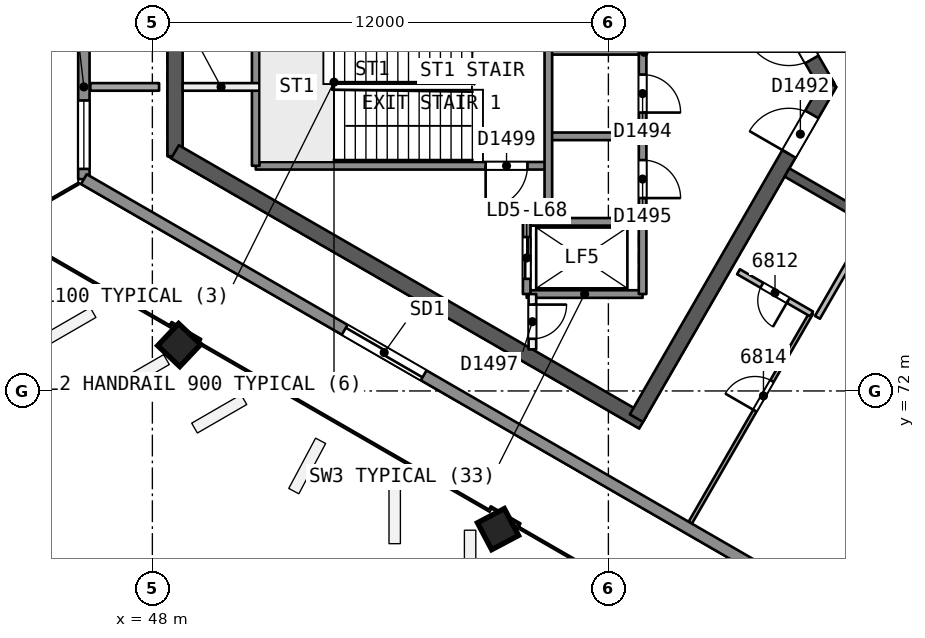
"""IFC4 building model, lengths in metres.
Left out: names, types, materials, properties, quantities, classifications, styles, units other than length and angle.
Written with IfcOpenShell. Run it as: python <this file> out.ifc"""

import sys

from ifc_helpers import new_model, si_unit, direction, frame, frame_2d, origin, origin_2d, place, context, subcontext, project, spatial, rectangle, extrude, element, fill, save


model = new_model("IFC4")
c1 = context("Model", 3, precision=1e-05, world=origin(), true_north=direction((0.0, 1.0)))
c2 = subcontext(c1, "Body", "Model", "MODEL_VIEW")
j1 = project(units=[si_unit("LENGTHUNIT", "METRE"), si_unit("PLANEANGLEUNIT", "RADIAN")], contexts=[c1])
p1 = place(None, origin())
s1 = spatial("IfcSite", under=j1, at=p1, CompositionType="ELEMENT")
p2 = place(p1, origin())
s2 = spatial("IfcBuilding", under=s1, at=p2, CompositionType="ELEMENT")
p3 = place(p2, frame((0.0, 0.0, 277.5)))
s3 = spatial("IfcBuildingStorey", under=s2, at=p3, CompositionType="ELEMENT", Elevation=277.5)
p4 = place(p3, frame((65.769, 80.0, 0.0), z_axis=(0.0, 0.0, 1.0), x_axis=(-0.50000177223, 0.866024380585, 0.0)))
e1 = element("IfcWall", 1, at=p4, inside=s3, PredefinedType="SHEAR", context=c2, shape_type="SweptSolid", body=[
    extrude(rectangle(XDim=10.265, YDim=0.4, at=frame_2d((5.132, 0.0))), origin(), (0.0, 0.0, 1.0), 3.7),
])
p5 = place(p4, frame((0.834, 0.0, 0.0)))
e2 = element("IfcOpeningElement", 2, at=p5, cuts=e1, PredefinedType="OPENING", context=c2, shape_type="SweptSolid", body=[
    extrude(rectangle(XDim=1.2, YDim=2.1, at=frame_2d((0.6, 1.05))), frame((0.0, 0.21, 0.0), z_axis=(0.0, -1.0, 0.0), x_axis=(1.0, 0.0, 0.0)), (0.0, 0.0, 1.0), 0.421),
])
p6 = place(p3, frame((48.597, 81.707, 0.0), z_axis=(0.0, 0.0, 1.0), x_axis=(0.0, -1.0, 0.0)))
e3 = element("IfcWall", 3, at=p6, inside=s3, PredefinedType="SHEAR", context=c2, shape_type="SweptSolid", body=[
    extrude(rectangle(XDim=3.53, YDim=0.4, at=frame_2d((1.765, 0.0))), origin(), (0.0, 0.0, 1.0), 3.7),
])
p7 = place(p3, frame((48.597, 78.293, 0.0), z_axis=(0.0, 0.0, 1.0), x_axis=(0.866026024469, -0.499998924941, 0.0)))
e4 = element("IfcWall", 4, at=p7, inside=s3, PredefinedType="SHEAR", context=c2, shape_type="SweptSolid", body=[
    extrude(rectangle(XDim=14.218, YDim=0.4, at=frame_2d((7.109, 0.0))), origin(), (0.0, 0.0, 1.0), 3.7),
])
p8 = place(p3, frame((60.737, 71.284, 0.0), z_axis=(0.0, 0.0, 1.0), x_axis=(0.50000547566, 0.866022242388, 0.0)))
e5 = element("IfcWall", 5, at=p8, inside=s3, PredefinedType="SHEAR", context=c2, shape_type="SweptSolid", body=[
    extrude(rectangle(XDim=10.18, YDim=0.4, at=frame_2d((5.09, 0.0))), origin(), (0.0, 0.0, 1.0), 3.7),
])
p9 = place(p8, frame((8.03, 0.0, 0.0)))
e6 = element("IfcOpeningElement", 6, at=p9, cuts=e5, PredefinedType="OPENING", context=c2, shape_type="SweptSolid", body=[
    extrude(rectangle(XDim=1.2, YDim=2.1, at=frame_2d((0.6, 1.05))), frame((0.0, 0.21, 0.0), z_axis=(0.0, -1.0, 0.0), x_axis=(1.0, 0.0, 0.0)), (0.0, 0.0, 1.0), 0.421),
])
p10 = place(p3, frame((64.7, 77.748, 0.0), z_axis=(0.0, 0.0, 1.0), x_axis=(0.866026492143, -0.499998114903, 0.0)))
e7 = element("IfcWall", 7, at=p10, inside=s3, PredefinedType="SHEAR", context=c2, shape_type="SweptSolid", body=[
    extrude(rectangle(XDim=15.588, YDim=0.25, at=frame_2d((7.794, 0.0))), origin(), (0.0, 0.0, 1.0), 3.3),
])
p11 = place(p10, frame((4.473, 0.0, 0.0)))
e8 = element("IfcOpeningElement", 8, at=p11, cuts=e7, PredefinedType="OPENING", context=c2, shape_type="SweptSolid", body=[
    extrude(rectangle(XDim=1.0, YDim=2.1, at=frame_2d((0.5, 1.05))), frame((0.0, 0.135, 0.0), z_axis=(0.0, -1.0, 0.0), x_axis=(1.0, 0.0, 0.0)), (0.0, 0.0, 1.0), 0.271),
])
p12 = place(p10, frame((13.917, 0.0, 0.0)))
e9 = element("IfcOpeningElement", 9, at=p12, cuts=e7, PredefinedType="OPENING", context=c2, shape_type="SweptSolid", body=[
    extrude(rectangle(XDim=1.1, YDim=2.1, at=frame_2d((0.55, 1.05))), frame((0.0, 0.135, 0.0), z_axis=(0.0, -1.0, 0.0), x_axis=(1.0, 0.0, 0.0)), (0.0, 0.0, 1.0), 0.271),
])
p13 = place(p3, frame((48.672, 73.2, 0.0), z_axis=(0.02855911485, 0.006793507689, 0.999569019734), x_axis=(-0.865318766308, 0.500768301983, 0.021319953197)))
e10 = element("IfcColumn", 10, at=p13, inside=s3, PredefinedType="COLUMN", context=c2, shape_type="SweptSolid", body=[
    extrude(rectangle(XDim=0.8, YDim=0.8, at=origin_2d()), origin(), (0.0, 0.0, 1.0), 3.702),
])
p14 = place(p3, frame((57.073, 68.35, 0.0), z_axis=(0.019328516974, 0.012138044789, 0.999739504221), x_axis=(-0.865682738121, 0.50047952503, 0.010660297569)))
e11 = element("IfcColumn", 11, at=p14, inside=s3, PredefinedType="COLUMN", context=c2, shape_type="SweptSolid", body=[
    extrude(rectangle(XDim=0.8, YDim=0.8, at=origin_2d()), origin(), (0.0, 0.0, 1.0), 3.701),
])
p15 = place(p3, frame((46.368, 80.0, 0.0), z_axis=(0.0, 0.0, 1.0), x_axis=(1.0, 0.0, 0.0)))
e12 = element("IfcWall", 12, at=p15, inside=s3, PredefinedType="PARTITIONING", context=c2, shape_type="SweptSolid", body=[
    extrude(rectangle(XDim=1.809, YDim=0.2, at=frame_2d((0.905, 0.0))), origin(), (0.0, 0.0, 1.0), 3.3),
])
p16 = place(p3, frame((62.154, 68.534, 0.0), z_axis=(0.0, 0.0, 1.0), x_axis=(0.499987773676, 0.866032462541, 0.0)))
e13 = element("IfcWall", 13, at=p16, inside=s3, PredefinedType="PARTITIONING", context=c2, shape_type="SweptSolid", body=[
    extrude(rectangle(XDim=6.372, YDim=0.1, at=frame_2d((3.186, 0.0))), origin(), (0.0, 0.0, 1.0), 3.3),
])
p17 = place(p16, frame((3.403, 0.0, 0.0)))
e14 = element("IfcOpeningElement", 14, at=p17, cuts=e13, PredefinedType="OPENING", context=c2, shape_type="SweptSolid", body=[
    extrude(rectangle(XDim=0.9, YDim=2.1, at=frame_2d((0.45, 1.05))), frame((0.0, 0.061, 0.0), z_axis=(0.0, -1.0, 0.0), x_axis=(1.0, 0.0, 0.0)), (0.0, 0.0, 1.0), 0.121),
])
p18 = place(p3, frame((65.347, 74.026, 0.0), z_axis=(0.0, 0.0, 1.0), x_axis=(-0.866042797968, 0.49996987118, 0.0)))
e15 = element("IfcWall", 15, at=p18, inside=s3, PredefinedType="PARTITIONING", context=c2, shape_type="SweptSolid", body=[
    extrude(rectangle(XDim=2.221, YDim=0.15, at=frame_2d((1.11, 0.0))), origin(), (0.0, 0.0, 1.0), 3.3),
])
p19 = place(p18, frame((0.711, 0.0, 0.0)))
e16 = element("IfcOpeningElement", 16, at=p19, cuts=e15, PredefinedType="OPENING", context=c2, shape_type="SweptSolid", body=[
    extrude(rectangle(XDim=0.8, YDim=2.1, at=frame_2d((0.4, 1.05))), frame((0.0, 0.085, 0.0), z_axis=(0.0, -1.0, 0.0), x_axis=(1.0, 0.0, 0.0)), (0.0, 0.0, 1.0), 0.171),
])
p20 = place(p3, frame((66.952, 76.448, 0.0), z_axis=(0.0, 0.0, 1.0), x_axis=(-0.499987231761, -0.866032775405, 0.0)))
e17 = element("IfcWall", 17, at=p20, inside=s3, PredefinedType="PARTITIONING", context=c2, shape_type="SweptSolid", body=[
    extrude(rectangle(XDim=2.9, YDim=0.15, at=frame_2d((1.45, 0.0))), origin(), (0.0, 0.0, 1.0), 3.3),
])
p21 = place(p3, frame((46.198, 77.573, 0.0), z_axis=(0.0, 0.0, 1.0), x_axis=(0.0, 1.0, 0.0)))
e18 = element("IfcWall", 18, at=p21, inside=s3, PredefinedType="SOLIDWALL", context=c2, shape_type="SweptSolid", body=[
    extrude(rectangle(XDim=4.854, YDim=0.3, at=frame_2d((2.427, 0.0))), origin(), (0.0, 0.0, 1.0), 3.3),
])
p22 = place(p21, frame((0.27, 0.0, 0.9)))
e19 = element("IfcOpeningElement", 19, at=p22, cuts=e18, PredefinedType="OPENING", context=c2, shape_type="SweptSolid", body=[
    extrude(rectangle(XDim=1.8, YDim=1.5, at=frame_2d((0.9, 0.75))), frame((0.0, 0.161, 0.0), z_axis=(0.0, -1.0, 0.0), x_axis=(1.0, 0.0, 0.0)), (0.0, 0.0, 1.0), 0.321),
])
p23 = place(p3, frame((87.299, 53.843, 0.0), z_axis=(0.0, 0.0, 1.0), x_axis=(-0.866024279277, 0.500001947699, 0.0)))
e20 = element("IfcWall", 20, at=p23, inside=s3, PredefinedType="SOLIDWALL", context=c2, shape_type="SweptSolid", body=[
    extrude(rectangle(XDim=47.46, YDim=0.3, at=frame_2d((23.73, 0.0))), origin(), (0.0, 0.0, 1.0), 3.3),
])
p24 = place(p23, frame((17.308, 0.0, 0.0)))
e21 = element("IfcOpeningElement", 21, at=p24, cuts=e20, PredefinedType="OPENING", context=c2, shape_type="SweptSolid", body=[
    extrude(rectangle(XDim=2.4, YDim=2.4, at=frame_2d((1.2, 1.2))), frame((0.0, 0.161, 0.0), z_axis=(0.0, -1.0, 0.0), x_axis=(1.0, 0.0, 0.0)), (0.0, 0.0, 1.0), 0.321),
])
p25 = place(p23, frame((37.135, 0.0, 0.0)))
e22 = element("IfcOpeningElement", 22, at=p25, cuts=e20, PredefinedType="OPENING", context=c2, shape_type="SweptSolid", body=[
    extrude(rectangle(XDim=2.4, YDim=2.4, at=frame_2d((1.2, 1.2))), frame((0.0, 0.161, 0.0), z_axis=(0.0, -1.0, 0.0), x_axis=(1.0, 0.0, 0.0)), (0.0, 0.0, 1.0), 0.321),
])
p26 = place(p23, frame((23.901, 0.0, 0.0)))
e23 = element("IfcOpeningElement", 23, at=p26, cuts=e20, PredefinedType="OPENING", context=c2, shape_type="SweptSolid", body=[
    extrude(rectangle(XDim=2.4, YDim=2.4, at=frame_2d((1.2, 1.2))), frame((0.0, 0.161, 0.0), z_axis=(0.0, -1.0, 0.0), x_axis=(1.0, 0.0, 0.0)), (0.0, 0.0, 1.0), 0.321),
])
p27 = place(p3, frame((60.9, 80.95, 0.0), z_axis=(0.0, 0.0, 1.0), x_axis=(-1.0, 0.0, 0.0)))
e24 = element("IfcWall", 24, at=p27, inside=s3, PredefinedType="SOLIDWALL", context=c2, shape_type="SweptSolid", body=[
    extrude(rectangle(XDim=2.48, YDim=0.2, at=frame_2d((1.24, 0.0))), origin(), (0.0, 0.0, 1.0), 3.3),
])
p28 = place(p3, frame((50.82, 80.0, 0.0), z_axis=(0.0, 0.0, 1.0), x_axis=(-1.0, 0.0, 0.0)))
e25 = element("IfcWall", 25, at=p28, inside=s3, PredefinedType="PARTITIONING", context=c2, shape_type="SweptSolid", body=[
    extrude(rectangle(XDim=2.023, YDim=0.2, at=frame_2d((1.012, 0.0))), origin(), (0.0, 0.0, 1.0), 3.3),
])
p29 = place(p3, frame((60.9, 78.7, 0.0), z_axis=(0.0, 0.0, 1.0), x_axis=(-1.0, 0.0, 0.0)))
e26 = element("IfcWall", 26, at=p29, inside=s3, PredefinedType="SOLIDWALL", context=c2, shape_type="SweptSolid", body=[
    extrude(rectangle(XDim=2.48, YDim=0.2, at=frame_2d((1.24, 0.0))), origin(), (0.0, 0.0, 1.0), 3.3),
])
p30 = place(p3, frame((58.42, 77.925, 0.0), z_axis=(0.0, 0.0, 1.0), x_axis=(-1.0, 0.0, 0.0)))
e27 = element("IfcWall", 27, at=p30, inside=s3, PredefinedType="SOLIDWALL", context=c2, shape_type="SweptSolid", body=[
    extrude(rectangle(XDim=7.7, YDim=0.2, at=frame_2d((3.85, 0.0))), origin(), (0.0, 0.0, 1.0), 3.3),
])
p31 = place(p30, frame((0.55, 0.0, 0.0)))
e28 = element("IfcOpeningElement", 28, at=p31, cuts=e27, PredefinedType="OPENING", context=c2, shape_type="SweptSolid", body=[
    extrude(rectangle(XDim=1.1, YDim=2.1, at=frame_2d((0.55, 1.05))), frame((0.0, 0.11, 0.0), z_axis=(0.0, -1.0, 0.0), x_axis=(1.0, 0.0, 0.0)), (0.0, 0.0, 1.0), 0.221),
])
for number, where, z_axis, x_axis in (
    (29, (60.9, 76.45, 0.0), (0.0, 0.0, 1.0), (-1.0, 0.0, 0.0)),
    (30, (60.9, 74.55, 0.0), (0.0, 0.0, 1.0), (-1.0, 0.0, 0.0)),
):
    element("IfcWall", number, at=place(p3, frame(where, z_axis=z_axis, x_axis=x_axis)), inside=s3, PredefinedType="SOLIDWALL", context=c2, shape_type="SweptSolid", body=[
        extrude(rectangle(XDim=3.05, YDim=0.2, at=frame_2d((1.525, 0.0))), origin(), (0.0, 0.0, 1.0), 3.3),
    ])
p32 = place(p3, frame((60.9, 85.45, 0.0), z_axis=(0.0, 0.0, 1.0), x_axis=(0.0, -1.0, 0.0)))
e31 = element("IfcWall", 31, at=p32, inside=s3, PredefinedType="SOLIDWALL", context=c2, shape_type="SweptSolid", body=[
    extrude(rectangle(XDim=10.9, YDim=0.2, at=frame_2d((5.45, 0.0))), origin(), (0.0, 0.0, 1.0), 3.3),
])
p33 = place(p32, frame((1.75, 0.0, 0.0)))
e32 = element("IfcOpeningElement", 32, at=p33, cuts=e31, PredefinedType="OPENING", context=c2, shape_type="SweptSolid", body=[
    extrude(rectangle(XDim=1.0, YDim=2.1, at=frame_2d((0.5, 1.05))), frame((0.0, 0.11, 0.0), z_axis=(0.0, -1.0, 0.0), x_axis=(1.0, 0.0, 0.0)), (0.0, 0.0, 1.0), 0.221),
])
p34 = place(p32, frame((5.125, 0.0, 0.0)))
e33 = element("IfcOpeningElement", 33, at=p34, cuts=e31, PredefinedType="OPENING", context=c2, shape_type="SweptSolid", body=[
    extrude(rectangle(XDim=1.0, YDim=2.1, at=frame_2d((0.5, 1.05))), frame((0.0, 0.11, 0.0), z_axis=(0.0, -1.0, 0.0), x_axis=(1.0, 0.0, 0.0)), (0.0, 0.0, 1.0), 0.221),
])
p35 = place(p32, frame((7.375, 0.0, 0.0)))
e34 = element("IfcOpeningElement", 34, at=p35, cuts=e31, PredefinedType="OPENING", context=c2, shape_type="SweptSolid", body=[
    extrude(rectangle(XDim=1.0, YDim=2.1, at=frame_2d((0.5, 1.05))), frame((0.0, 0.11, 0.0), z_axis=(0.0, -1.0, 0.0), x_axis=(1.0, 0.0, 0.0)), (0.0, 0.0, 1.0), 0.221),
])
p36 = place(p3, frame((58.42, 87.148, 0.0), z_axis=(0.0, 0.0, 1.0), x_axis=(0.0, -1.0, 0.0)))
e35 = element("IfcWall", 35, at=p36, inside=s3, PredefinedType="SOLIDWALL", context=c2, shape_type="SweptSolid", body=[
    extrude(rectangle(XDim=10.698, YDim=0.2, at=frame_2d((5.349, 0.0))), origin(), (0.0, 0.0, 1.0), 3.3),
])
p37 = place(p36, frame((0.399, 0.0, 0.0)))
e36 = element("IfcOpeningElement", 36, at=p37, cuts=e35, PredefinedType="OPENING", context=c2, shape_type="SweptSolid", body=[
    extrude(rectangle(XDim=0.9, YDim=2.1, at=frame_2d((0.45, 1.05))), frame((0.0, 0.11, 0.0), z_axis=(0.0, -1.0, 0.0), x_axis=(1.0, 0.0, 0.0)), (0.0, 0.0, 1.0), 0.221),
])
p38 = place(p3, frame((58.0, 74.55, 0.0), z_axis=(0.0, 0.0, 1.0), x_axis=(0.0, -1.0, 0.0)))
e37 = element("IfcWall", 37, at=p38, inside=s3, PredefinedType="PARTITIONING", context=c2, shape_type="SweptSolid", body=[
    extrude(rectangle(XDim=1.455, YDim=0.2, at=frame_2d((0.728, 0.0))), origin(), (0.0, 0.0, 1.0), 3.3),
])
p39 = place(p38, frame((0.278, 0.0, 0.0)))
e38 = element("IfcOpeningElement", 38, at=p39, cuts=e37, PredefinedType="OPENING", context=c2, shape_type="SweptSolid", body=[
    extrude(rectangle(XDim=0.9, YDim=2.1, at=frame_2d((0.45, 1.05))), frame((0.0, 0.11, 0.0), z_axis=(0.0, -1.0, 0.0), x_axis=(1.0, 0.0, 0.0)), (0.0, 0.0, 1.0), 0.221),
])
p40 = place(p3, frame((57.85, 76.45, 0.0), z_axis=(0.0, 0.0, 1.0), x_axis=(0.0, -1.0, 0.0)))
e39 = element("IfcWall", 39, at=p40, inside=s3, PredefinedType="SOLIDWALL", context=c2, shape_type="SweptSolid", body=[
    extrude(rectangle(XDim=1.9, YDim=0.2, at=frame_2d((0.95, 0.0))), origin(), (0.0, 0.0, 1.0), 3.3),
])
p41 = place(p40, frame((0.4, 0.0, 0.0)))
e40 = element("IfcOpeningElement", 40, at=p41, cuts=e39, PredefinedType="OPENING", context=c2, shape_type="SweptSolid", body=[
    extrude(rectangle(XDim=1.1, YDim=2.1, at=frame_2d((0.55, 1.05))), frame((0.0, 0.11, 0.0), z_axis=(0.0, -1.0, 0.0), x_axis=(1.0, 0.0, 0.0)), (0.0, 0.0, 1.0), 0.221),
])
p42 = place(p3, frame((50.72, 82.075, 0.0), z_axis=(0.0, 0.0, 1.0), x_axis=(0.0, -1.0, 0.0)))
e41 = element("IfcWall", 41, at=p42, inside=s3, PredefinedType="SOLIDWALL", context=c2, shape_type="SweptSolid", body=[
    extrude(rectangle(XDim=4.15, YDim=0.2, at=frame_2d((2.075, 0.0))), origin(), (0.0, 0.0, 1.0), 3.3),
])
p43 = place(p19, origin())
e42 = element("IfcDoor", 42, at=p43, inside=s3, OperationType="SINGLE_SWING_LEFT", PredefinedType="NOTDEFINED", context=c2, shape_type="SweptSolid", body=[
    extrude(rectangle(XDim=0.8, YDim=2.1, at=frame_2d((0.4, 1.05))), frame((0.0, 0.025, 0.0), z_axis=(0.0, -1.0, 0.0), x_axis=(1.0, 0.0, 0.0)), (0.0, 0.0, 1.0), 0.05),
])
fill(e16, e42)
p44 = place(p17, origin())
e43 = element("IfcDoor", 43, at=p44, inside=s3, OperationType="SINGLE_SWING_LEFT", PredefinedType="NOTDEFINED", context=c2, shape_type="SweptSolid", body=[
    extrude(rectangle(XDim=0.9, YDim=2.1, at=frame_2d((0.45, 1.05))), frame((0.0, 0.025, 0.0), z_axis=(0.0, -1.0, 0.0), x_axis=(1.0, 0.0, 0.0)), (0.0, 0.0, 1.0), 0.05),
])
fill(e14, e43)
p45 = place(p22, origin())
e44 = element("IfcWindow", 44, at=p45, inside=s3, PartitioningType="SINGLE_PANEL", PredefinedType="WINDOW", context=c2, shape_type="SweptSolid", body=[
    extrude(rectangle(XDim=1.8, YDim=1.5, at=frame_2d((0.9, 0.75))), frame((0.0, 0.03, 0.0), z_axis=(0.0, -1.0, 0.0), x_axis=(1.0, 0.0, 0.0)), (0.0, 0.0, 1.0), 0.06),
])
fill(e19, e44)
p46 = place(p25, origin())
e45 = element("IfcDoor", 45, at=p46, inside=s3, OperationType="SLIDING_TO_RIGHT", PredefinedType="NOTDEFINED", context=c2, shape_type="SweptSolid", body=[
    extrude(rectangle(XDim=2.4, YDim=2.4, at=frame_2d((1.2, 1.2))), frame((0.0, 0.025, 0.0), z_axis=(0.0, -1.0, 0.0), x_axis=(1.0, 0.0, 0.0)), (0.0, 0.0, 1.0), 0.05),
])
fill(e22, e45)
p47 = place(p5, origin())
e46 = element("IfcDoor", 46, at=p47, inside=s3, OperationType="SINGLE_SWING_RIGHT", PredefinedType="NOTDEFINED", context=c2, shape_type="SweptSolid", body=[
    extrude(rectangle(XDim=1.2, YDim=2.1, at=frame_2d((0.6, 1.05))), frame((0.0, 0.025, 0.0), z_axis=(0.0, -1.0, 0.0), x_axis=(1.0, 0.0, 0.0)), (0.0, 0.0, 1.0), 0.05),
])
fill(e2, e46)
p48 = place(p9, origin())
e47 = element("IfcDoor", 47, at=p48, inside=s3, OperationType="SINGLE_SWING_LEFT", PredefinedType="NOTDEFINED", context=c2, shape_type="SweptSolid", body=[
    extrude(rectangle(XDim=1.2, YDim=2.1, at=frame_2d((0.6, 1.05))), frame((0.0, 0.025, 0.0), z_axis=(0.0, -1.0, 0.0), x_axis=(1.0, 0.0, 0.0)), (0.0, 0.0, 1.0), 0.05),
])
fill(e6, e47)
p49 = place(p41, origin())
e48 = element("IfcDoor", 48, at=p49, inside=s3, OperationType="SLIDING_TO_RIGHT", PredefinedType="NOTDEFINED", context=c2, shape_type="SweptSolid", body=[
    extrude(rectangle(XDim=1.1, YDim=2.1, at=frame_2d((0.55, 1.05))), frame((0.0, 0.025, 0.0), z_axis=(0.0, -1.0, 0.0), x_axis=(1.0, 0.0, 0.0)), (0.0, 0.0, 1.0), 0.05),
])
fill(e40, e48)
p50 = place(p34, origin())
e49 = element("IfcDoor", 49, at=p50, inside=s3, OperationType="SINGLE_SWING_RIGHT", PredefinedType="NOTDEFINED", context=c2, shape_type="SweptSolid", body=[
    extrude(rectangle(XDim=1.0, YDim=2.1, at=frame_2d((0.5, 1.05))), frame((0.0, 0.025, 0.0), z_axis=(0.0, -1.0, 0.0), x_axis=(1.0, 0.0, 0.0)), (0.0, 0.0, 1.0), 0.05),
])
fill(e33, e49)
p51 = place(p35, origin())
e50 = element("IfcDoor", 50, at=p51, inside=s3, OperationType="SINGLE_SWING_RIGHT", PredefinedType="NOTDEFINED", context=c2, shape_type="SweptSolid", body=[
    extrude(rectangle(XDim=1.0, YDim=2.1, at=frame_2d((0.5, 1.05))), frame((0.0, 0.025, 0.0), z_axis=(0.0, -1.0, 0.0), x_axis=(1.0, 0.0, 0.0)), (0.0, 0.0, 1.0), 0.05),
])
fill(e34, e50)
p52 = place(p39, origin())
e51 = element("IfcDoor", 51, at=p52, inside=s3, OperationType="SINGLE_SWING_LEFT", PredefinedType="NOTDEFINED", context=c2, shape_type="SweptSolid", body=[
    extrude(rectangle(XDim=0.9, YDim=2.1, at=frame_2d((0.45, 1.05))), frame((0.0, 0.025, 0.0), z_axis=(0.0, -1.0, 0.0), x_axis=(1.0, 0.0, 0.0)), (0.0, 0.0, 1.0), 0.05),
])
fill(e38, e51)
p53 = place(p31, origin())
e52 = element("IfcDoor", 52, at=p53, inside=s3, OperationType="SINGLE_SWING_RIGHT", PredefinedType="NOTDEFINED", context=c2, shape_type="SweptSolid", body=[
    extrude(rectangle(XDim=1.1, YDim=2.1, at=frame_2d((0.55, 1.05))), frame((0.0, 0.025, 0.0), z_axis=(0.0, -1.0, 0.0), x_axis=(1.0, 0.0, 0.0)), (0.0, 0.0, 1.0), 0.05),
])
fill(e28, e52)
save(model, sys.argv[1])
